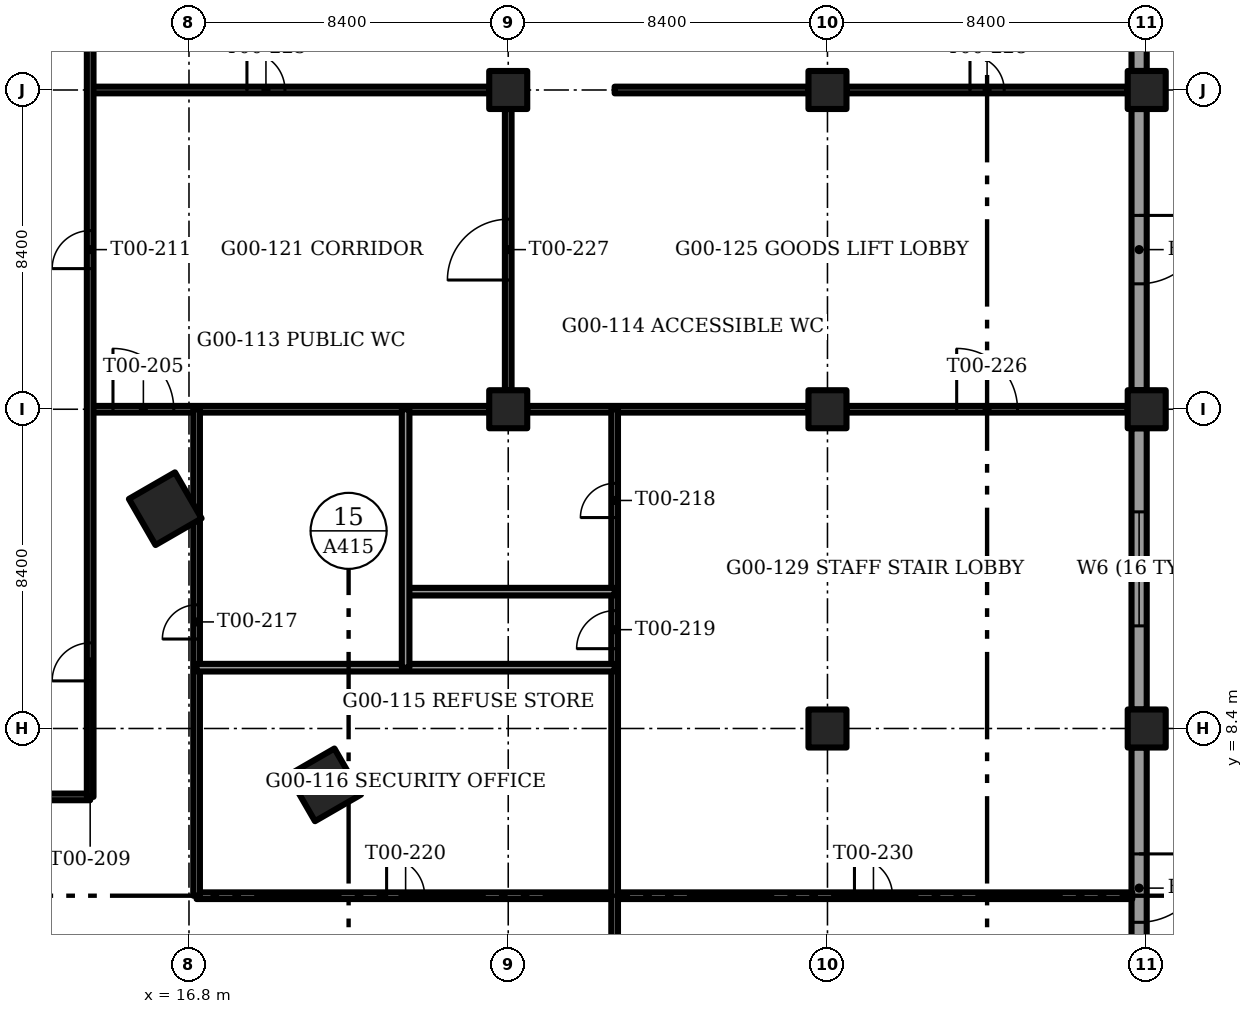
"""IFC4 building model, lengths in metres.
Left out: names, types, materials, properties, quantities, classifications, styles, units other than length and angle.
Written with IfcOpenShell. Run it as: python <this file> out.ifc"""

import sys

from ifc_helpers import new_model, si_unit, direction, frame, frame_2d, origin, origin_2d, place, context, subcontext, project, spatial, rectangle, extrude, element, fill, save


model = new_model("IFC4")
c1 = context("Model", 3, precision=1e-05, world=origin(), true_north=direction((0.0, 1.0)))
c2 = subcontext(c1, "Body", "Model", "MODEL_VIEW")
j1 = project(units=[si_unit("LENGTHUNIT", "METRE"), si_unit("PLANEANGLEUNIT", "RADIAN")], contexts=[c1])
p1 = place(None, origin())
s1 = spatial("IfcSite", under=j1, at=p1, CompositionType="ELEMENT")
p2 = place(p1, origin())
s2 = spatial("IfcBuilding", under=s1, at=p2, CompositionType="ELEMENT")
p3 = place(p2, origin())
s3 = spatial("IfcBuildingStorey", under=s2, at=p3, CompositionType="ELEMENT", Elevation=0.0)
for number, where, z_axis, x_axis in (
    (1, (25.2, 16.8, -0.35), (0.0, 0.0, 1.0), (1.0, 0.0, 0.0)),
    (2, (25.2, 25.2, -0.35), (0.0, 0.0, 1.0), (1.0, 0.0, 0.0)),
    (3, (33.6, 8.4, -0.35), (0.0, 0.0, 1.0), (1.0, 0.0, 0.0)),
    (4, (33.6, 16.8, -0.35), (0.0, 0.0, 1.0), (1.0, 0.0, 0.0)),
    (5, (33.6, 25.2, -0.35), (0.0, 0.0, 1.0), (1.0, 0.0, 0.0)),
    (6, (42.0, 8.4, -0.35), (0.0, 0.0, 1.0), (1.0, 0.0, 0.0)),
    (7, (42.0, 16.8, -0.35), (0.0, 0.0, 1.0), (1.0, 0.0, 0.0)),
    (8, (42.0, 25.2, -0.35), (0.0, 0.0, 1.0), (1.0, 0.0, 0.0)),
):
    element("IfcColumn", number, at=place(p3, frame(where, z_axis=z_axis, x_axis=x_axis)), inside=s3, PredefinedType="COLUMN", context=c2, shape_type="SweptSolid", body=[
        extrude(rectangle(XDim=1.0, YDim=1.0, at=origin_2d()), origin(), (0.0, 0.0, 1.0), 6.0),
    ])
for number, where, z_axis, x_axis in (
    (9, (20.371, 6.917, -0.35), (0.0, 0.0, 1.0), (0.5, -0.866, 0.0)),
    (10, (16.175, 14.183, -0.35), (0.0, 0.0, 1.0), (0.5, -0.866, 0.0)),
):
    element("IfcColumn", number, at=place(p3, frame(where, z_axis=z_axis, x_axis=x_axis)), inside=s3, PredefinedType="COLUMN", context=c2, shape_type="SweptSolid", body=[
        extrude(rectangle(XDim=1.4, YDim=1.4, at=origin_2d()), origin(), (0.0, 0.0, 1.0), 5.15),
    ])
p4 = place(p3, frame((41.8, 33.1, 0.0), z_axis=(0.0, 0.0, 1.0), x_axis=(0.0, -1.0, 0.0)))
e11 = element("IfcWall", 11, at=p4, inside=s3, PredefinedType="SOLIDWALL", context=c2, shape_type="SweptSolid", body=[
    extrude(rectangle(XDim=7.4, YDim=0.4, at=frame_2d((3.7, 0.0))), origin(), (0.0, 0.0, 1.0), 5.65),
])
p5 = place(p4, frame((2.2, 0.0, 1.0)))
e12 = element("IfcOpeningElement", 12, at=p5, cuts=e11, PredefinedType="OPENING", context=c2, shape_type="SweptSolid", body=[
    extrude(rectangle(XDim=3.0, YDim=2.2, at=frame_2d((1.5, 1.1))), frame((0.0, 0.2, 0.0), z_axis=(0.0, -1.0, 0.0), x_axis=(1.0, 0.0, 0.0)), (0.0, 0.0, 1.0), 0.4),
])
p6 = place(p3, frame((41.8, 24.7, 0.0), z_axis=(0.0, 0.0, 1.0), x_axis=(0.0, -1.0, 0.0)))
e13 = element("IfcWall", 13, at=p6, inside=s3, PredefinedType="SOLIDWALL", context=c2, shape_type="SweptSolid", body=[
    extrude(rectangle(XDim=7.4, YDim=0.4, at=frame_2d((3.7, 0.0))), origin(), (0.0, 0.0, 1.0), 5.65),
])
p7 = place(p6, frame((2.8, 0.0, 0.0)))
e14 = element("IfcOpeningElement", 14, at=p7, cuts=e13, PredefinedType="OPENING", context=c2, shape_type="SweptSolid", body=[
    extrude(rectangle(XDim=1.8, YDim=2.4, at=frame_2d((0.9, 1.2))), frame((0.0, 0.2, 0.0), z_axis=(0.0, -1.0, 0.0), x_axis=(1.0, 0.0, 0.0)), (0.0, 0.0, 1.0), 0.4),
])
p8 = place(p3, frame((41.8, 16.3, 0.0), z_axis=(0.0, 0.0, 1.0), x_axis=(0.0, -1.0, 0.0)))
e15 = element("IfcWall", 15, at=p8, inside=s3, PredefinedType="SOLIDWALL", context=c2, shape_type="SweptSolid", body=[
    extrude(rectangle(XDim=7.4, YDim=0.4, at=frame_2d((3.7, 0.0))), origin(), (0.0, 0.0, 1.0), 5.65),
])
p9 = place(p8, frame((2.2, 0.0, 1.0)))
e16 = element("IfcOpeningElement", 16, at=p9, cuts=e15, PredefinedType="OPENING", context=c2, shape_type="SweptSolid", body=[
    extrude(rectangle(XDim=3.0, YDim=2.2, at=frame_2d((1.5, 1.1))), frame((0.0, 0.2, 0.0), z_axis=(0.0, -1.0, 0.0), x_axis=(1.0, 0.0, 0.0)), (0.0, 0.0, 1.0), 0.4),
])
p10 = place(p3, frame((41.8, 7.9, 0.0), z_axis=(0.0, 0.0, 1.0), x_axis=(0.0, -1.0, 0.0)))
e17 = element("IfcWall", 17, at=p10, inside=s3, PredefinedType="SOLIDWALL", context=c2, shape_type="SweptSolid", body=[
    extrude(rectangle(XDim=7.4, YDim=0.4, at=frame_2d((3.7, 0.0))), origin(), (0.0, 0.0, 1.0), 5.65),
])
p11 = place(p10, frame((2.8, 0.0, 0.0)))
e18 = element("IfcOpeningElement", 18, at=p11, cuts=e17, PredefinedType="OPENING", context=c2, shape_type="SweptSolid", body=[
    extrude(rectangle(XDim=1.8, YDim=2.4, at=frame_2d((0.9, 1.2))), frame((0.0, 0.2, 0.0), z_axis=(0.0, -1.0, 0.0), x_axis=(1.0, 0.0, 0.0)), (0.0, 0.0, 1.0), 0.4),
])
p12 = place(p3, frame((17.0, 4.0, 0.0), z_axis=(0.0, 0.0, 1.0), x_axis=(1.0, 0.0, 0.0)))
e19 = element("IfcWall", 19, at=p12, inside=s3, PredefinedType="PARTITIONING", context=c2, shape_type="SweptSolid", body=[
    extrude(rectangle(XDim=24.62, YDim=0.175, at=frame_2d((12.31, 0.0))), origin(), (0.0, 0.0, 1.0), 4.8),
])
p13 = place(p12, frame((5.0, 0.0, 0.0)))
e20 = element("IfcOpeningElement", 20, at=p13, cuts=e19, PredefinedType="OPENING", context=c2, shape_type="SweptSolid", body=[
    extrude(rectangle(XDim=1.0, YDim=2.1, at=frame_2d((0.5, 1.05))), frame((0.0, 0.087, 0.0), z_axis=(0.0, -1.0, 0.0), x_axis=(1.0, 0.0, 0.0)), (0.0, 0.0, 1.0), 0.175),
])
p14 = place(p12, frame((17.31, 0.0, 0.0)))
e21 = element("IfcOpeningElement", 21, at=p14, cuts=e19, PredefinedType="OPENING", context=c2, shape_type="SweptSolid", body=[
    extrude(rectangle(XDim=1.0, YDim=2.1, at=frame_2d((0.5, 1.05))), frame((0.0, 0.087, 0.0), z_axis=(0.0, -1.0, 0.0), x_axis=(1.0, 0.0, 0.0)), (0.0, 0.0, 1.0), 0.175),
])
p15 = place(p3, frame((12.08, 6.6, 0.0), z_axis=(0.0, 0.0, 1.0), x_axis=(1.0, 0.0, 0.0)))
e22 = element("IfcWall", 22, at=p15, inside=s3, PredefinedType="PARTITIONING", context=c2, shape_type="SweptSolid", body=[
    extrude(rectangle(XDim=2.12, YDim=0.175, at=frame_2d((1.06, 0.0))), origin(), (0.0, 0.0, 1.0), 5.65),
])
p16 = place(p3, frame((14.2, 16.8, 0.0), z_axis=(0.0, 0.0, 1.0), x_axis=(1.0, 0.0, 0.0)))
e23 = element("IfcWall", 23, at=p16, inside=s3, PredefinedType="PARTITIONING", context=c2, shape_type="SweptSolid", body=[
    extrude(rectangle(XDim=10.5, YDim=0.175, at=frame_2d((5.25, 0.0))), origin(), (0.0, 0.0, 1.0), 4.8),
])
p17 = place(p16, frame((0.6, 0.0, 0.0)))
e24 = element("IfcOpeningElement", 24, at=p17, cuts=e23, PredefinedType="OPENING", context=c2, shape_type="SweptSolid", body=[
    extrude(rectangle(XDim=1.6, YDim=2.1, at=frame_2d((0.8, 1.05))), frame((0.0, 0.087, 0.0), z_axis=(0.0, -1.0, 0.0), x_axis=(1.0, 0.0, 0.0)), (0.0, 0.0, 1.0), 0.175),
])
p18 = place(p3, frame((25.7, 16.8, 0.0), z_axis=(0.0, 0.0, 1.0), x_axis=(1.0, 0.0, 0.0)))
e25 = element("IfcWall", 25, at=p18, inside=s3, PredefinedType="PARTITIONING", context=c2, shape_type="SweptSolid", body=[
    extrude(rectangle(XDim=7.4, YDim=0.175, at=frame_2d((3.7, 0.0))), origin(), (0.0, 0.0, 1.0), 5.65),
])
p19 = place(p3, frame((34.1, 16.8, 0.0), z_axis=(0.0, 0.0, 1.0), x_axis=(1.0, 0.0, 0.0)))
e26 = element("IfcWall", 26, at=p19, inside=s3, PredefinedType="PARTITIONING", context=c2, shape_type="SweptSolid", body=[
    extrude(rectangle(XDim=7.4, YDim=0.175, at=frame_2d((3.7, 0.0))), origin(), (0.0, 0.0, 1.0), 5.65),
])
p20 = place(p19, frame((2.9, 0.0, 0.0)))
e27 = element("IfcOpeningElement", 27, at=p20, cuts=e26, PredefinedType="OPENING", context=c2, shape_type="SweptSolid", body=[
    extrude(rectangle(XDim=1.6, YDim=2.1, at=frame_2d((0.8, 1.05))), frame((0.0, 0.087, 0.0), z_axis=(0.0, -1.0, 0.0), x_axis=(1.0, 0.0, 0.0)), (0.0, 0.0, 1.0), 0.175),
])
p21 = place(p3, frame((14.2, 25.2, 0.0), z_axis=(0.0, 0.0, 1.0), x_axis=(1.0, 0.0, 0.0)))
e28 = element("IfcWall", 28, at=p21, inside=s3, PredefinedType="PARTITIONING", context=c2, shape_type="SweptSolid", body=[
    extrude(rectangle(XDim=10.5, YDim=0.175, at=frame_2d((5.25, 0.0))), origin(), (0.0, 0.0, 1.0), 5.65),
])
p22 = place(p21, frame((4.125, 0.0, 0.0)))
e29 = element("IfcOpeningElement", 29, at=p22, cuts=e28, PredefinedType="OPENING", context=c2, shape_type="SweptSolid", body=[
    extrude(rectangle(XDim=1.0, YDim=2.1, at=frame_2d((0.5, 1.05))), frame((0.0, 0.087, 0.0), z_axis=(0.0, -1.0, 0.0), x_axis=(1.0, 0.0, 0.0)), (0.0, 0.0, 1.0), 0.175),
])
p23 = place(p3, frame((28.0, 25.2, 0.0), z_axis=(0.0, 0.0, 1.0), x_axis=(1.0, 0.0, 0.0)))
e30 = element("IfcWall", 30, at=p23, inside=s3, PredefinedType="PARTITIONING", context=c2, shape_type="SweptSolid", body=[
    extrude(rectangle(XDim=5.1, YDim=0.175, at=frame_2d((2.55, 0.0))), origin(), (0.0, 0.0, 1.0), 5.65),
])
p24 = place(p3, frame((34.1, 25.2, 0.0), z_axis=(0.0, 0.0, 1.0), x_axis=(1.0, 0.0, 0.0)))
e31 = element("IfcWall", 31, at=p24, inside=s3, PredefinedType="PARTITIONING", context=c2, shape_type="SweptSolid", body=[
    extrude(rectangle(XDim=7.4, YDim=0.175, at=frame_2d((3.7, 0.0))), origin(), (0.0, 0.0, 1.0), 5.65),
])
p25 = place(p24, frame((3.25, 0.0, 0.0)))
e32 = element("IfcOpeningElement", 32, at=p25, cuts=e31, PredefinedType="OPENING", context=c2, shape_type="SweptSolid", body=[
    extrude(rectangle(XDim=0.9, YDim=2.1, at=frame_2d((0.45, 1.05))), frame((0.0, 0.087, 0.0), z_axis=(0.0, -1.0, 0.0), x_axis=(1.0, 0.0, 0.0)), (0.0, 0.0, 1.0), 0.175),
])
p26 = place(p3, frame((14.2, 6.6, 0.0), z_axis=(0.0, 0.0, 1.0), x_axis=(0.0, 1.0, 0.0)))
e33 = element("IfcWall", 33, at=p26, inside=s3, PredefinedType="PARTITIONING", context=c2, shape_type="SweptSolid", body=[
    extrude(rectangle(XDim=26.62, YDim=0.175, at=frame_2d((13.31, 0.0))), origin(), (0.0, 0.0, 1.0), 4.8),
])
p27 = place(p26, frame((3.052, 0.0, 0.0)))
e34 = element("IfcOpeningElement", 34, at=p27, cuts=e33, PredefinedType="OPENING", context=c2, shape_type="SweptSolid", body=[
    extrude(rectangle(XDim=1.0, YDim=2.1, at=frame_2d((0.5, 1.05))), frame((0.0, 0.087, 0.0), z_axis=(0.0, -1.0, 0.0), x_axis=(1.0, 0.0, 0.0)), (0.0, 0.0, 1.0), 0.175),
])
p28 = place(p26, frame((13.9, 0.0, 0.0)))
e35 = element("IfcOpeningElement", 35, at=p28, cuts=e33, PredefinedType="OPENING", context=c2, shape_type="SweptSolid", body=[
    extrude(rectangle(XDim=1.0, YDim=2.1, at=frame_2d((0.5, 1.05))), frame((0.0, 0.087, 0.0), z_axis=(0.0, -1.0, 0.0), x_axis=(1.0, 0.0, 0.0)), (0.0, 0.0, 1.0), 0.175),
])
p29 = place(p3, frame((17.0, 4.0, 0.0), z_axis=(0.0, 0.0, 1.0), x_axis=(0.0, 1.0, 0.0)))
e36 = element("IfcWall", 36, at=p29, inside=s3, PredefinedType="PARTITIONING", context=c2, shape_type="SweptSolid", body=[
    extrude(rectangle(XDim=12.8, YDim=0.175, at=frame_2d((6.4, 0.0))), origin(), (0.0, 0.0, 1.0), 4.8),
])
p30 = place(p29, frame((6.754, 0.0, 0.0)))
e37 = element("IfcOpeningElement", 37, at=p30, cuts=e36, PredefinedType="OPENING", context=c2, shape_type="SweptSolid", body=[
    extrude(rectangle(XDim=0.9, YDim=2.1, at=frame_2d((0.45, 1.05))), frame((0.0, 0.087, 0.0), z_axis=(0.0, -1.0, 0.0), x_axis=(1.0, 0.0, 0.0)), (0.0, 0.0, 1.0), 0.175),
])
p31 = place(p3, frame((25.2, 17.3, 0.0), z_axis=(0.0, 0.0, 1.0), x_axis=(0.0, 1.0, 0.0)))
e38 = element("IfcWall", 38, at=p31, inside=s3, PredefinedType="PARTITIONING", context=c2, shape_type="SweptSolid", body=[
    extrude(rectangle(XDim=7.4, YDim=0.175, at=frame_2d((3.7, 0.0))), origin(), (0.0, 0.0, 1.0), 5.65),
])
p32 = place(p31, frame((2.9, 0.0, 0.0)))
e39 = element("IfcOpeningElement", 39, at=p32, cuts=e38, PredefinedType="OPENING", context=c2, shape_type="SweptSolid", body=[
    extrude(rectangle(XDim=1.6, YDim=2.1, at=frame_2d((0.8, 1.05))), frame((0.0, 0.087, 0.0), z_axis=(0.0, -1.0, 0.0), x_axis=(1.0, 0.0, 0.0)), (0.0, 0.0, 1.0), 0.175),
])
p33 = place(p3, frame((28.0, -8.0, 0.0), z_axis=(0.0, 0.0, 1.0), x_axis=(0.0, 1.0, 0.0)))
e40 = element("IfcWall", 40, at=p33, inside=s3, PredefinedType="PARTITIONING", context=c2, shape_type="SweptSolid", body=[
    extrude(rectangle(XDim=24.8, YDim=0.175, at=frame_2d((12.4, 0.0))), origin(), (0.0, 0.0, 1.0), 5.65),
])
p34 = place(p33, frame((21.95, 0.0, 0.0)))
e41 = element("IfcOpeningElement", 41, at=p34, cuts=e40, PredefinedType="OPENING", context=c2, shape_type="SweptSolid", body=[
    extrude(rectangle(XDim=0.9, YDim=2.1, at=frame_2d((0.45, 1.05))), frame((0.0, 0.087, 0.0), z_axis=(0.0, -1.0, 0.0), x_axis=(1.0, 0.0, 0.0)), (0.0, 0.0, 1.0), 0.175),
])
p35 = place(p33, frame((18.5, 0.0, 0.0)))
e42 = element("IfcOpeningElement", 42, at=p35, cuts=e40, PredefinedType="OPENING", context=c2, shape_type="SweptSolid", body=[
    extrude(rectangle(XDim=1.0, YDim=2.1, at=frame_2d((0.5, 1.05))), frame((0.0, 0.087, 0.0), z_axis=(0.0, -1.0, 0.0), x_axis=(1.0, 0.0, 0.0)), (0.0, 0.0, 1.0), 0.175),
])
p36 = place(p3, frame((17.0, 10.0, 0.0), z_axis=(0.0, 0.0, 1.0), x_axis=(1.0, 0.0, 0.0)))
e43 = element("IfcWall", 43, at=p36, inside=s3, PredefinedType="PARTITIONING", context=c2, shape_type="SweptSolid", body=[
    extrude(rectangle(XDim=11.0, YDim=0.2, at=frame_2d((5.5, 0.0))), origin(), (0.0, 0.0, 1.0), 4.8),
])
p37 = place(p3, frame((22.5, 12.0, 0.0), z_axis=(0.0, 0.0, 1.0), x_axis=(1.0, 0.0, 0.0)))
e44 = element("IfcWall", 44, at=p37, inside=s3, PredefinedType="PARTITIONING", context=c2, shape_type="SweptSolid", body=[
    extrude(rectangle(XDim=5.5, YDim=0.2, at=frame_2d((2.75, 0.0))), origin(), (0.0, 0.0, 1.0), 5.65),
])
p38 = place(p3, frame((22.5, 10.0, 0.0), z_axis=(0.0, 0.0, 1.0), x_axis=(0.0, 1.0, 0.0)))
e45 = element("IfcWall", 45, at=p38, inside=s3, PredefinedType="PARTITIONING", context=c2, shape_type="SweptSolid", body=[
    extrude(rectangle(XDim=6.8, YDim=0.2, at=frame_2d((3.4, 0.0))), origin(), (0.0, 0.0, 1.0), 5.65),
])
p39 = place(p7, origin())
e46 = element("IfcDoor", 46, at=p39, inside=s3, OperationType="SINGLE_SWING_LEFT", PredefinedType="DOOR", context=c2, shape_type="SweptSolid", body=[
    extrude(rectangle(XDim=1.8, YDim=2.4, at=frame_2d((0.9, 1.2))), frame((0.0, 0.025, 0.0), z_axis=(0.0, -1.0, 0.0), x_axis=(1.0, 0.0, 0.0)), (0.0, 0.0, 1.0), 0.05),
])
fill(e14, e46)
p40 = place(p9, origin())
e47 = element("IfcWindow", 47, at=p40, inside=s3, PartitioningType="SINGLE_PANEL", PredefinedType="WINDOW", context=c2, shape_type="SweptSolid", body=[
    extrude(rectangle(XDim=3.0, YDim=2.2, at=frame_2d((1.5, 1.1))), frame((0.0, 0.03, 0.0), z_axis=(0.0, -1.0, 0.0), x_axis=(1.0, 0.0, 0.0)), (0.0, 0.0, 1.0), 0.06),
])
fill(e16, e47)
p41 = place(p11, origin())
e48 = element("IfcDoor", 48, at=p41, inside=s3, OperationType="SINGLE_SWING_LEFT", PredefinedType="DOOR", context=c2, shape_type="SweptSolid", body=[
    extrude(rectangle(XDim=1.8, YDim=2.4, at=frame_2d((0.9, 1.2))), frame((0.0, 0.025, 0.0), z_axis=(0.0, -1.0, 0.0), x_axis=(1.0, 0.0, 0.0)), (0.0, 0.0, 1.0), 0.05),
])
fill(e18, e48)
p42 = place(p17, origin())
e49 = element("IfcDoor", 49, at=p42, inside=s3, OperationType="DOUBLE_DOOR_SINGLE_SWING", PredefinedType="DOOR", context=c2, shape_type="SweptSolid", body=[
    extrude(rectangle(XDim=1.6, YDim=2.1, at=frame_2d((0.8, 1.05))), frame((0.0, 0.025, 0.0), z_axis=(0.0, -1.0, 0.0), x_axis=(1.0, 0.0, 0.0)), (0.0, 0.0, 1.0), 0.05),
])
fill(e24, e49)
p43 = place(p27, origin())
e50 = element("IfcDoor", 50, at=p43, inside=s3, OperationType="SINGLE_SWING_LEFT", PredefinedType="DOOR", context=c2, shape_type="SweptSolid", body=[
    extrude(rectangle(XDim=1.0, YDim=2.1, at=frame_2d((0.5, 1.05))), frame((0.0, 0.025, 0.0), z_axis=(0.0, -1.0, 0.0), x_axis=(1.0, 0.0, 0.0)), (0.0, 0.0, 1.0), 0.05),
])
fill(e34, e50)
p44 = place(p28, origin())
e51 = element("IfcDoor", 51, at=p44, inside=s3, OperationType="SINGLE_SWING_LEFT", PredefinedType="DOOR", context=c2, shape_type="SweptSolid", body=[
    extrude(rectangle(XDim=1.0, YDim=2.1, at=frame_2d((0.5, 1.05))), frame((0.0, 0.025, 0.0), z_axis=(0.0, -1.0, 0.0), x_axis=(1.0, 0.0, 0.0)), (0.0, 0.0, 1.0), 0.05),
])
fill(e35, e51)
p45 = place(p30, origin())
e52 = element("IfcDoor", 52, at=p45, inside=s3, OperationType="SINGLE_SWING_LEFT", PredefinedType="DOOR", context=c2, shape_type="SweptSolid", body=[
    extrude(rectangle(XDim=0.9, YDim=2.1, at=frame_2d((0.45, 1.05))), frame((0.0, 0.025, 0.0), z_axis=(0.0, -1.0, 0.0), x_axis=(1.0, 0.0, 0.0)), (0.0, 0.0, 1.0), 0.05),
])
fill(e37, e52)
p46 = place(p34, origin())
e53 = element("IfcDoor", 53, at=p46, inside=s3, OperationType="SINGLE_SWING_RIGHT", PredefinedType="DOOR", context=c2, shape_type="SweptSolid", body=[
    extrude(rectangle(XDim=0.9, YDim=2.1, at=frame_2d((0.45, 1.05))), frame((0.0, 0.025, 0.0), z_axis=(0.0, -1.0, 0.0), x_axis=(1.0, 0.0, 0.0)), (0.0, 0.0, 1.0), 0.05),
])
fill(e41, e53)
p47 = place(p35, origin())
e54 = element("IfcDoor", 54, at=p47, inside=s3, OperationType="SINGLE_SWING_LEFT", PredefinedType="DOOR", context=c2, shape_type="SweptSolid", body=[
    extrude(rectangle(XDim=1.0, YDim=2.1, at=frame_2d((0.5, 1.05))), frame((0.0, 0.025, 0.0), z_axis=(0.0, -1.0, 0.0), x_axis=(1.0, 0.0, 0.0)), (0.0, 0.0, 1.0), 0.05),
])
fill(e42, e54)
p48 = place(p13, origin())
e55 = element("IfcDoor", 55, at=p48, inside=s3, OperationType="SINGLE_SWING_RIGHT", PredefinedType="DOOR", context=c2, shape_type="SweptSolid", body=[
    extrude(rectangle(XDim=1.0, YDim=2.1, at=frame_2d((0.5, 1.05))), frame((0.0, 0.025, 0.0), z_axis=(0.0, -1.0, 0.0), x_axis=(1.0, 0.0, 0.0)), (0.0, 0.0, 1.0), 0.05),
])
fill(e20, e55)
p49 = place(p22, origin())
e56 = element("IfcDoor", 56, at=p49, inside=s3, OperationType="SINGLE_SWING_LEFT", PredefinedType="DOOR", context=c2, shape_type="SweptSolid", body=[
    extrude(rectangle(XDim=1.0, YDim=2.1, at=frame_2d((0.5, 1.05))), frame((0.0, 0.025, 0.0), z_axis=(0.0, -1.0, 0.0), x_axis=(1.0, 0.0, 0.0)), (0.0, 0.0, 1.0), 0.05),
])
fill(e29, e56)
p50 = place(p20, origin())
e57 = element("IfcDoor", 57, at=p50, inside=s3, OperationType="DOUBLE_DOOR_SINGLE_SWING", PredefinedType="DOOR", context=c2, shape_type="SweptSolid", body=[
    extrude(rectangle(XDim=1.6, YDim=2.1, at=frame_2d((0.8, 1.05))), frame((0.0, 0.025, 0.0), z_axis=(0.0, -1.0, 0.0), x_axis=(1.0, 0.0, 0.0)), (0.0, 0.0, 1.0), 0.05),
])
fill(e27, e57)
p51 = place(p32, origin())
e58 = element("IfcDoor", 58, at=p51, inside=s3, OperationType="DOUBLE_DOOR_SINGLE_SWING", PredefinedType="DOOR", context=c2, shape_type="SweptSolid", body=[
    extrude(rectangle(XDim=1.6, YDim=2.1, at=frame_2d((0.8, 1.05))), frame((0.0, 0.025, 0.0), z_axis=(0.0, -1.0, 0.0), x_axis=(1.0, 0.0, 0.0)), (0.0, 0.0, 1.0), 0.05),
])
fill(e39, e58)
p52 = place(p25, origin())
e59 = element("IfcDoor", 59, at=p52, inside=s3, OperationType="SINGLE_SWING_RIGHT", PredefinedType="DOOR", context=c2, shape_type="SweptSolid", body=[
    extrude(rectangle(XDim=0.9, YDim=2.1, at=frame_2d((0.45, 1.05))), frame((0.0, 0.025, 0.0), z_axis=(0.0, -1.0, 0.0), x_axis=(1.0, 0.0, 0.0)), (0.0, 0.0, 1.0), 0.05),
])
fill(e32, e59)
p53 = place(p14, origin())
e60 = element("IfcDoor", 60, at=p53, inside=s3, OperationType="SINGLE_SWING_RIGHT", PredefinedType="DOOR", context=c2, shape_type="SweptSolid", body=[
    extrude(rectangle(XDim=1.0, YDim=2.1, at=frame_2d((0.5, 1.05))), frame((0.0, 0.025, 0.0), z_axis=(0.0, -1.0, 0.0), x_axis=(1.0, 0.0, 0.0)), (0.0, 0.0, 1.0), 0.05),
])
fill(e21, e60)
save(model, sys.argv[1])
